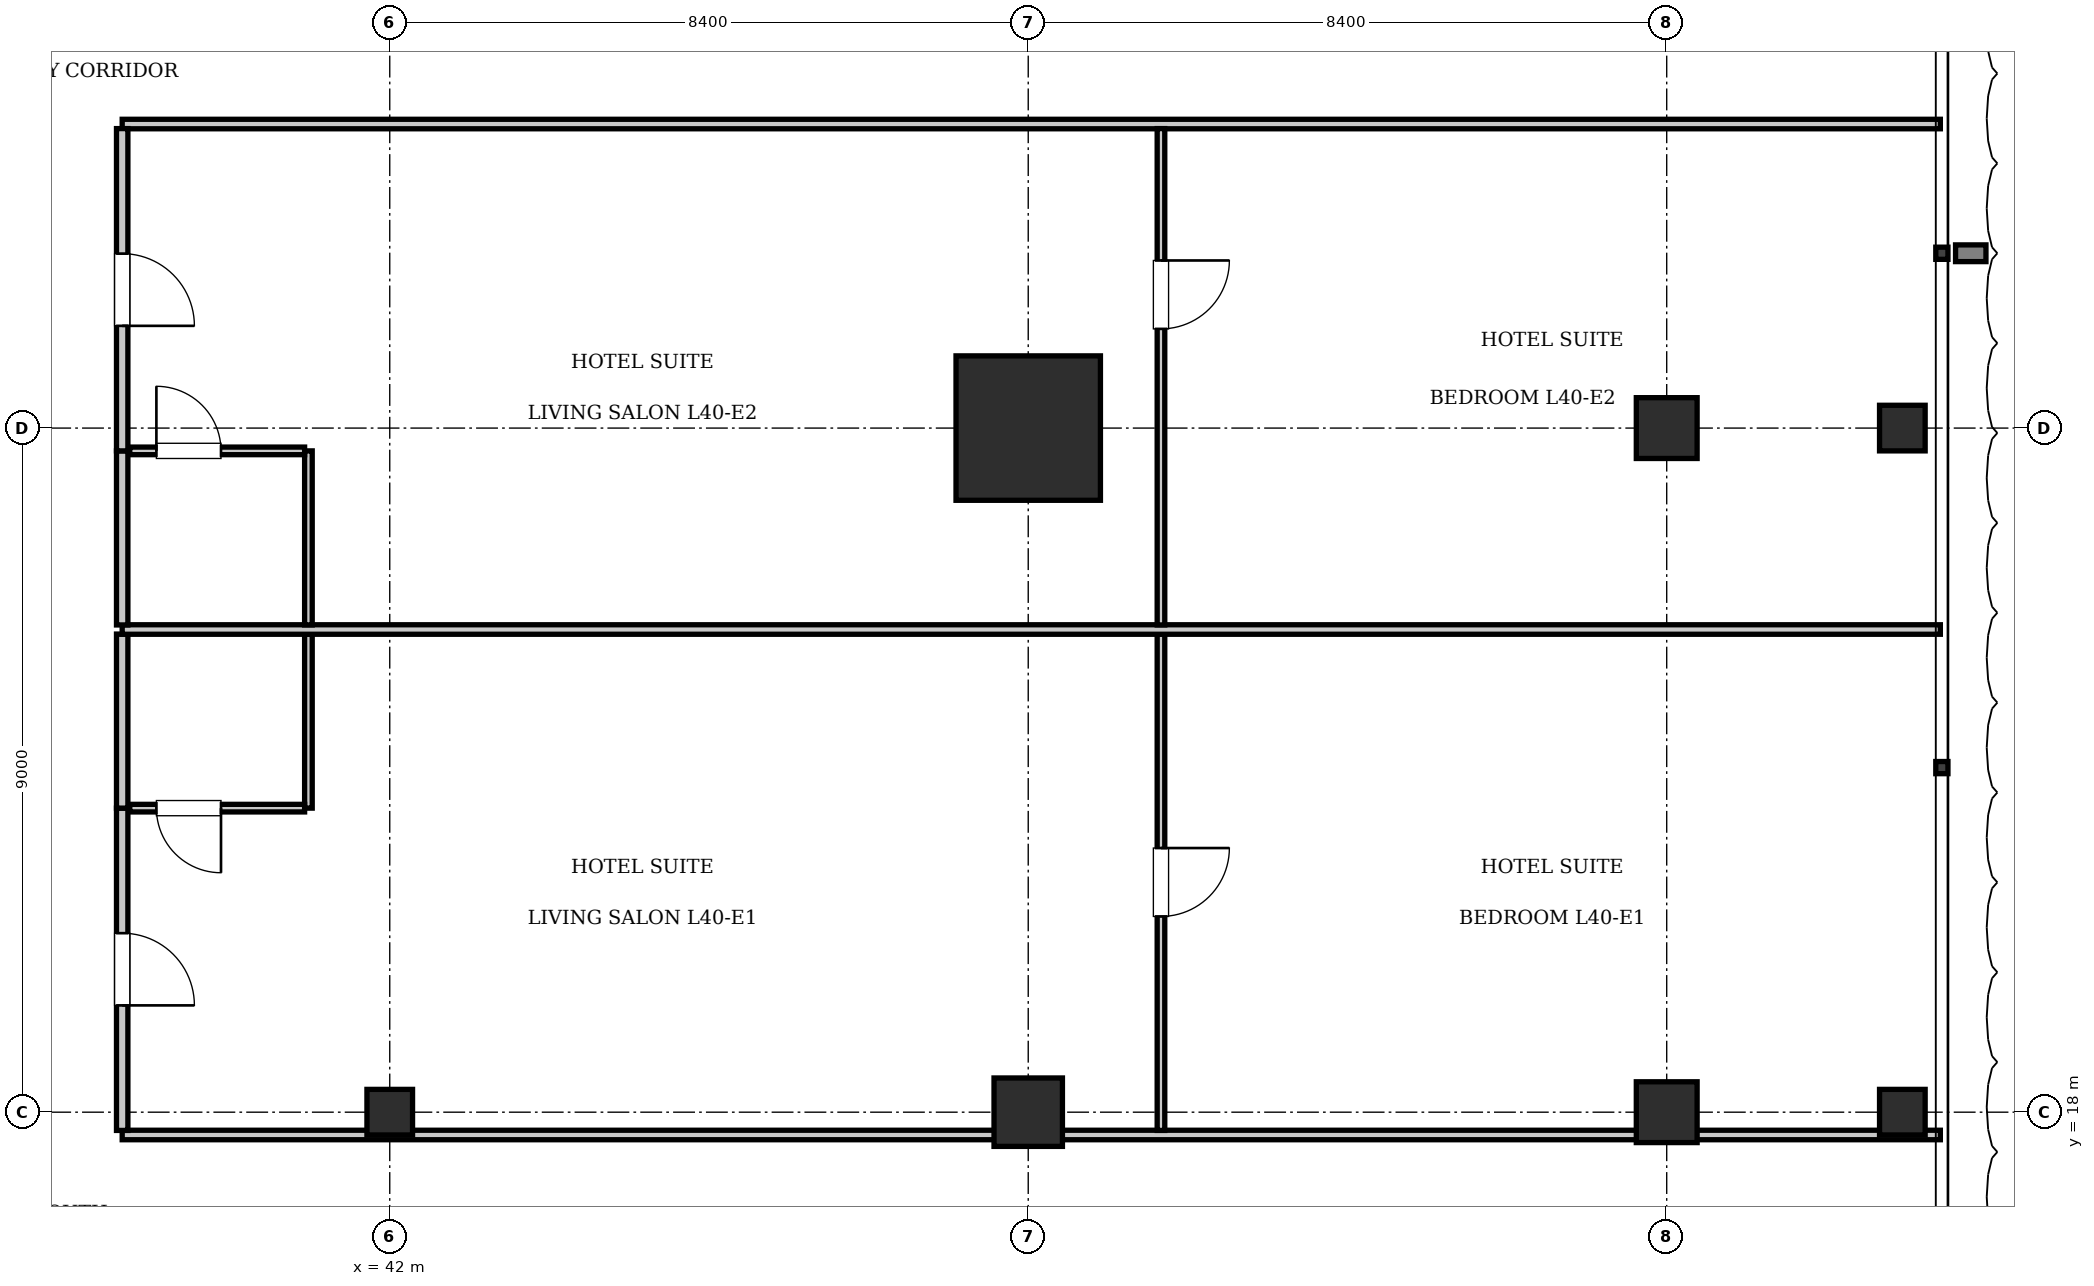
"""IFC4 building model, lengths in metres.
Left out: names, types, materials, properties, quantities, classifications, styles, units other than length and angle.
Written with IfcOpenShell. Run it as: python <this file> out.ifc"""

import sys

from ifc_helpers import new_model, si_unit, direction, frame, frame_2d, origin, origin_2d, place, context, subcontext, project, spatial, rectangle, i_section, extrude, element, fill, save


model = new_model("IFC4")
c1 = context("Model", 3, precision=1e-05, world=origin(), true_north=direction((0.0, 1.0)))
c2 = subcontext(c1, "Body", "Model", "MODEL_VIEW")
j1 = project(units=[si_unit("LENGTHUNIT", "METRE"), si_unit("PLANEANGLEUNIT", "RADIAN")], contexts=[c1])
p1 = place(None, origin())
s1 = spatial("IfcSite", under=j1, at=p1, CompositionType="ELEMENT")
p2 = place(p1, origin())
s2 = spatial("IfcBuilding", under=s1, at=p2, CompositionType="ELEMENT")
p3 = place(p2, frame((0.0, 0.0, 165.9)))
s3 = spatial("IfcBuildingStorey", under=s2, at=p3, CompositionType="ELEMENT", Elevation=165.9)
p4 = place(p3, frame((50.4, 27.0, 0.0), z_axis=(0.0, 0.0, 1.0), x_axis=(1.0, 0.0, 0.0)))
e1 = element("IfcColumn", 1, at=p4, inside=s3, PredefinedType="COLUMN", context=c2, shape_type="SweptSolid", body=[
    extrude(rectangle(XDim=1.9, YDim=1.9, at=origin_2d()), origin(), (0.0, 0.0, 1.0), 3.85),
])
p5 = place(p3, frame((50.4, 18.0, 0.0), z_axis=(0.0, 0.0, 1.0), x_axis=(1.0, 0.0, 0.0)))
e2 = element("IfcColumn", 2, at=p5, inside=s3, PredefinedType="COLUMN", context=c2, shape_type="SweptSolid", body=[
    extrude(rectangle(XDim=0.9, YDim=0.9, at=origin_2d()), origin(), (0.0, 0.0, 1.0), 3.85),
])
p6 = place(p3, frame((42.0, 18.0, 0.0), z_axis=(0.0, 0.0, 1.0), x_axis=(1.0, 0.0, 0.0)))
e3 = element("IfcColumn", 3, at=p6, inside=s3, PredefinedType="COLUMN", context=c2, shape_type="SweptSolid", body=[
    extrude(i_section(OverallWidth=0.6, OverallDepth=0.6, WebThickness=0.025, FlangeThickness=0.038, at=origin_2d()), origin(), (0.0, 0.0, 1.0), 3.85),
])
for number, where, z_axis, x_axis in (
    (4, (58.8, 18.0, 0.0), (0.0, 0.0, 1.0), (1.0, 0.0, 0.0)),
    (5, (58.8, 27.0, 0.0), (0.0, 0.0, 1.0), (1.0, 0.0, 0.0)),
):
    element("IfcColumn", number, at=place(p3, frame(where, z_axis=z_axis, x_axis=x_axis)), inside=s3, PredefinedType="COLUMN", context=c2, shape_type="SweptSolid", body=[
        extrude(rectangle(XDim=0.8, YDim=0.8, at=origin_2d()), origin(), (0.0, 0.0, 1.0), 3.85),
    ])
for number, where, z_axis, x_axis in (
    (6, (61.9, 18.0, 0.0), (0.0, 0.0, 1.0), (1.0, 0.0, 0.0)),
    (7, (61.9, 27.0, 0.0), (0.0, 0.0, 1.0), (1.0, 0.0, 0.0)),
):
    element("IfcColumn", number, at=place(p3, frame(where, z_axis=z_axis, x_axis=x_axis)), inside=s3, PredefinedType="COLUMN", context=c2, shape_type="SweptSolid", body=[
        extrude(i_section(OverallWidth=0.6, OverallDepth=0.6, WebThickness=0.025, FlangeThickness=0.038, at=origin_2d()), origin(), (0.0, 0.0, 1.0), 3.85),
    ])
for number, where, z_axis, x_axis in (
    (8, (38.48, 17.7, 0.0), (0.0, 0.0, 1.0), (1.0, 0.0, 0.0)),
    (9, (38.48, 31.0, 0.0), (0.0, 0.0, 1.0), (1.0, 0.0, 0.0)),
):
    element("IfcWall", number, at=place(p3, frame(where, z_axis=z_axis, x_axis=x_axis)), inside=s3, PredefinedType="PARTITIONING", context=c2, shape_type="SweptSolid", body=[
        extrude(rectangle(XDim=23.92, YDim=0.125, at=frame_2d((11.96, 0.0))), origin(), (0.0, 0.0, 1.0), 3.61),
    ])
p7 = place(p3, frame((38.48, 17.76, 0.0), z_axis=(0.0, 0.0, 1.0), x_axis=(0.0, 1.0, 0.0)))
e10 = element("IfcWall", 10, at=p7, inside=s3, PredefinedType="PARTITIONING", context=c2, shape_type="SweptSolid", body=[
    extrude(rectangle(XDim=4.24, YDim=0.15, at=frame_2d((2.12, 0.0))), origin(), (0.0, 0.0, 1.0), 3.61),
])
p8 = place(p7, frame((1.645, 0.0, 0.0)))
e11 = element("IfcOpeningElement", 11, at=p8, cuts=e10, PredefinedType="OPENING", context=c2, shape_type="SweptSolid", body=[
    extrude(rectangle(XDim=0.95, YDim=2.15, at=frame_2d((0.475, 1.075))), frame((0.0, 0.085, 0.0), z_axis=(0.0, -1.0, 0.0), x_axis=(1.0, 0.0, 0.0)), (0.0, 0.0, 1.0), 0.17),
])
p9 = place(p3, frame((38.48, 22.0, 0.0), z_axis=(0.0, 0.0, 1.0), x_axis=(0.0, 1.0, 0.0)))
e12 = element("IfcWall", 12, at=p9, inside=s3, PredefinedType="PARTITIONING", context=c2, shape_type="SweptSolid", body=[
    extrude(rectangle(XDim=2.29, YDim=0.15, at=frame_2d((1.145, 0.0))), origin(), (0.0, 0.0, 1.0), 3.61),
])
p10 = place(p3, frame((40.93, 22.0, 0.0), z_axis=(0.0, 0.0, 1.0), x_axis=(0.0, 1.0, 0.0)))
e13 = element("IfcWall", 13, at=p10, inside=s3, PredefinedType="PARTITIONING", context=c2, shape_type="SweptSolid", body=[
    extrude(rectangle(XDim=2.29, YDim=0.1, at=frame_2d((1.145, 0.0))), origin(), (0.0, 0.0, 1.0), 3.61),
])
p11 = place(p3, frame((38.58, 22.0, 0.0), z_axis=(0.0, 0.0, 1.0), x_axis=(1.0, 0.0, 0.0)))
e14 = element("IfcWall", 14, at=p11, inside=s3, PredefinedType="PARTITIONING", context=c2, shape_type="SweptSolid", body=[
    extrude(rectangle(XDim=2.3, YDim=0.1, at=frame_2d((1.15, 0.0))), origin(), (0.0, 0.0, 1.0), 3.61),
])
p12 = place(p11, frame((0.35, 0.0, 0.0)))
e15 = element("IfcOpeningElement", 15, at=p12, cuts=e14, PredefinedType="OPENING", context=c2, shape_type="SweptSolid", body=[
    extrude(rectangle(XDim=0.85, YDim=2.1, at=frame_2d((0.425, 1.05))), frame((0.0, 0.06, 0.0), z_axis=(0.0, -1.0, 0.0), x_axis=(1.0, 0.0, 0.0)), (0.0, 0.0, 1.0), 0.12),
])
p13 = place(p3, frame((52.146, 17.76, 0.0), z_axis=(0.0, 0.0, 1.0), x_axis=(0.0, 1.0, 0.0)))
e16 = element("IfcWall", 16, at=p13, inside=s3, PredefinedType="PARTITIONING", context=c2, shape_type="SweptSolid", body=[
    extrude(rectangle(XDim=6.53, YDim=0.1, at=frame_2d((3.265, 0.0))), origin(), (0.0, 0.0, 1.0), 3.61),
])
p14 = place(p13, frame((2.815, 0.0, 0.0)))
e17 = element("IfcOpeningElement", 17, at=p14, cuts=e16, PredefinedType="OPENING", context=c2, shape_type="SweptSolid", body=[
    extrude(rectangle(XDim=0.9, YDim=2.1, at=frame_2d((0.45, 1.05))), frame((0.0, 0.06, 0.0), z_axis=(0.0, -1.0, 0.0), x_axis=(1.0, 0.0, 0.0)), (0.0, 0.0, 1.0), 0.12),
])
p15 = place(p3, frame((38.48, 24.35, 0.0), z_axis=(0.0, 0.0, 1.0), x_axis=(1.0, 0.0, 0.0)))
e18 = element("IfcWall", 18, at=p15, inside=s3, PredefinedType="PARTITIONING", context=c2, shape_type="SweptSolid", body=[
    extrude(rectangle(XDim=23.92, YDim=0.125, at=frame_2d((11.96, 0.0))), origin(), (0.0, 0.0, 1.0), 3.61),
])
p16 = place(p3, frame((38.48, 24.41, 0.0), z_axis=(0.0, 0.0, 1.0), x_axis=(0.0, 1.0, 0.0)))
e19 = element("IfcWall", 19, at=p16, inside=s3, PredefinedType="PARTITIONING", context=c2, shape_type="SweptSolid", body=[
    extrude(rectangle(XDim=2.29, YDim=0.15, at=frame_2d((1.145, 0.0))), origin(), (0.0, 0.0, 1.0), 3.61),
])
p17 = place(p3, frame((38.48, 26.7, 0.0), z_axis=(0.0, 0.0, 1.0), x_axis=(0.0, 1.0, 0.0)))
e20 = element("IfcWall", 20, at=p17, inside=s3, PredefinedType="PARTITIONING", context=c2, shape_type="SweptSolid", body=[
    extrude(rectangle(XDim=4.24, YDim=0.15, at=frame_2d((2.12, 0.0))), origin(), (0.0, 0.0, 1.0), 3.61),
])
p18 = place(p17, frame((1.645, 0.0, 0.0)))
e21 = element("IfcOpeningElement", 21, at=p18, cuts=e20, PredefinedType="OPENING", context=c2, shape_type="SweptSolid", body=[
    extrude(rectangle(XDim=0.95, YDim=2.15, at=frame_2d((0.475, 1.075))), frame((0.0, 0.085, 0.0), z_axis=(0.0, -1.0, 0.0), x_axis=(1.0, 0.0, 0.0)), (0.0, 0.0, 1.0), 0.17),
])
p19 = place(p3, frame((40.93, 24.41, 0.0), z_axis=(0.0, 0.0, 1.0), x_axis=(0.0, 1.0, 0.0)))
e22 = element("IfcWall", 22, at=p19, inside=s3, PredefinedType="PARTITIONING", context=c2, shape_type="SweptSolid", body=[
    extrude(rectangle(XDim=2.29, YDim=0.1, at=frame_2d((1.145, 0.0))), origin(), (0.0, 0.0, 1.0), 3.61),
])
p20 = place(p3, frame((38.58, 26.7, 0.0), z_axis=(0.0, 0.0, 1.0), x_axis=(1.0, 0.0, 0.0)))
e23 = element("IfcWall", 23, at=p20, inside=s3, PredefinedType="PARTITIONING", context=c2, shape_type="SweptSolid", body=[
    extrude(rectangle(XDim=2.3, YDim=0.1, at=frame_2d((1.15, 0.0))), origin(), (0.0, 0.0, 1.0), 3.61),
])
p21 = place(p20, frame((0.35, 0.0, 0.0)))
e24 = element("IfcOpeningElement", 24, at=p21, cuts=e23, PredefinedType="OPENING", context=c2, shape_type="SweptSolid", body=[
    extrude(rectangle(XDim=0.85, YDim=2.1, at=frame_2d((0.425, 1.05))), frame((0.0, 0.06, 0.0), z_axis=(0.0, -1.0, 0.0), x_axis=(1.0, 0.0, 0.0)), (0.0, 0.0, 1.0), 0.12),
])
p22 = place(p3, frame((52.146, 24.41, 0.0), z_axis=(0.0, 0.0, 1.0), x_axis=(0.0, 1.0, 0.0)))
e25 = element("IfcWall", 25, at=p22, inside=s3, PredefinedType="PARTITIONING", context=c2, shape_type="SweptSolid", body=[
    extrude(rectangle(XDim=6.53, YDim=0.1, at=frame_2d((3.265, 0.0))), origin(), (0.0, 0.0, 1.0), 3.61),
])
p23 = place(p22, frame((3.895, 0.0, 0.0)))
e26 = element("IfcOpeningElement", 26, at=p23, cuts=e25, PredefinedType="OPENING", context=c2, shape_type="SweptSolid", body=[
    extrude(rectangle(XDim=0.9, YDim=2.1, at=frame_2d((0.45, 1.05))), frame((0.0, 0.06, 0.0), z_axis=(0.0, -1.0, 0.0), x_axis=(1.0, 0.0, 0.0)), (0.0, 0.0, 1.0), 0.12),
])
p24 = place(p12, frame((0.85, 0.0, 0.0), z_axis=(0.0, 0.0, 1.0), x_axis=(-1.0, 0.0, 0.0)))
e27 = element("IfcDoor", 27, at=p24, inside=s3, OperationType="SINGLE_SWING_LEFT", PredefinedType="DOOR", context=c2, shape_type="SweptSolid", body=[
    extrude(rectangle(XDim=0.85, YDim=2.1, at=frame_2d((0.425, 1.05))), frame((0.0, 0.025, 0.0), z_axis=(0.0, -1.0, 0.0), x_axis=(1.0, 0.0, 0.0)), (0.0, 0.0, 1.0), 0.05),
])
fill(e15, e27)
p25 = place(p8, frame((0.95, 0.0, 0.0), z_axis=(0.0, 0.0, 1.0), x_axis=(-1.0, 0.0, 0.0)))
e28 = element("IfcDoor", 28, at=p25, inside=s3, OperationType="SINGLE_SWING_RIGHT", PredefinedType="DOOR", context=c2, shape_type="SweptSolid", body=[
    extrude(rectangle(XDim=0.95, YDim=2.15, at=frame_2d((0.475, 1.075))), frame((0.0, 0.025, 0.0), z_axis=(0.0, -1.0, 0.0), x_axis=(1.0, 0.0, 0.0)), (0.0, 0.0, 1.0), 0.05),
])
fill(e11, e28)
p26 = place(p14, frame((0.9, 0.0, 0.0), z_axis=(0.0, 0.0, 1.0), x_axis=(-1.0, 0.0, 0.0)))
e29 = element("IfcDoor", 29, at=p26, inside=s3, OperationType="SINGLE_SWING_LEFT", PredefinedType="DOOR", context=c2, shape_type="SweptSolid", body=[
    extrude(rectangle(XDim=0.9, YDim=2.1, at=frame_2d((0.45, 1.05))), frame((0.0, 0.025, 0.0), z_axis=(0.0, -1.0, 0.0), x_axis=(1.0, 0.0, 0.0)), (0.0, 0.0, 1.0), 0.05),
])
fill(e17, e29)
p27 = place(p21, origin())
e30 = element("IfcDoor", 30, at=p27, inside=s3, OperationType="SINGLE_SWING_LEFT", PredefinedType="DOOR", context=c2, shape_type="SweptSolid", body=[
    extrude(rectangle(XDim=0.85, YDim=2.1, at=frame_2d((0.425, 1.05))), frame((0.0, 0.025, 0.0), z_axis=(0.0, -1.0, 0.0), x_axis=(1.0, 0.0, 0.0)), (0.0, 0.0, 1.0), 0.05),
])
fill(e24, e30)
p28 = place(p18, frame((0.95, 0.0, 0.0), z_axis=(0.0, 0.0, 1.0), x_axis=(-1.0, 0.0, 0.0)))
e31 = element("IfcDoor", 31, at=p28, inside=s3, OperationType="SINGLE_SWING_RIGHT", PredefinedType="DOOR", context=c2, shape_type="SweptSolid", body=[
    extrude(rectangle(XDim=0.95, YDim=2.15, at=frame_2d((0.475, 1.075))), frame((0.0, 0.025, 0.0), z_axis=(0.0, -1.0, 0.0), x_axis=(1.0, 0.0, 0.0)), (0.0, 0.0, 1.0), 0.05),
])
fill(e21, e31)
p29 = place(p23, frame((0.9, 0.0, 0.0), z_axis=(0.0, 0.0, 1.0), x_axis=(-1.0, 0.0, 0.0)))
e32 = element("IfcDoor", 32, at=p29, inside=s3, OperationType="SINGLE_SWING_LEFT", PredefinedType="DOOR", context=c2, shape_type="SweptSolid", body=[
    extrude(rectangle(XDim=0.9, YDim=2.1, at=frame_2d((0.45, 1.05))), frame((0.0, 0.025, 0.0), z_axis=(0.0, -1.0, 0.0), x_axis=(1.0, 0.0, 0.0)), (0.0, 0.0, 1.0), 0.05),
])
fill(e26, e32)
save(model, sys.argv[1])
